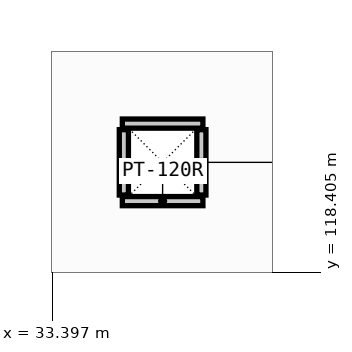
"""IFC4 building model, lengths in metres.
Left out: names, types, materials, properties, quantities, classifications, styles, units other than length and angle.
Written with IfcOpenShell. Run it as: python <this file> out.ifc"""

import sys

from ifc_helpers import new_model, si_unit, direction, frame, frame_2d, origin, place, context, subcontext, project, spatial, rectangle, extrude, element, save


model = new_model("IFC4")
c1 = context("Model", 3, precision=1e-05, world=origin(), true_north=direction((0.0, 1.0)))
c2 = subcontext(c1, "Body", "Model", "MODEL_VIEW")
j1 = project(units=[si_unit("LENGTHUNIT", "METRE"), si_unit("PLANEANGLEUNIT", "RADIAN")], contexts=[c1])
p1 = place(None, origin())
s1 = spatial("IfcSite", under=j1, at=p1, CompositionType="ELEMENT")
p2 = place(p1, origin())
s2 = spatial("IfcBuilding", under=s1, at=p2, CompositionType="ELEMENT")
p3 = place(p2, frame((0.0, 0.0, 4.8)))
s3 = spatial("IfcBuildingStorey", under=s2, at=p3, CompositionType="ELEMENT", Elevation=4.8)
for number, where, z_axis, x_axis in (
    (1, (34.32, 119.34, 0.0), (0.0, 0.0, 1.0), (1.0, 0.0, 0.0)),
    (2, (34.32, 120.36, 0.0), (0.0, 0.0, 1.0), (1.0, 0.0, 0.0)),
):
    element("IfcWall", number, at=place(p3, frame(where, z_axis=z_axis, x_axis=x_axis)), inside=s3, PredefinedType="PARTITIONING", context=c2, shape_type="SweptSolid", body=[
        extrude(rectangle(XDim=1.06, YDim=0.12, at=frame_2d((0.53, 0.0))), origin(), (0.0, 0.0, 1.0), 2.95),
    ])
for number, where, z_axis, x_axis in (
    (3, (34.34, 119.42, 0.0), (0.0, 0.0, 1.0), (0.0, 1.0, 0.0)),
    (4, (35.36, 119.42, 0.0), (0.0, 0.0, 1.0), (0.0, 1.0, 0.0)),
):
    element("IfcWall", number, at=place(p3, frame(where, z_axis=z_axis, x_axis=x_axis)), inside=s3, PredefinedType="PARTITIONING", context=c2, shape_type="SweptSolid", body=[
        extrude(rectangle(XDim=0.86, YDim=0.12, at=frame_2d((0.43, 0.0))), origin(), (0.0, 0.0, 1.0), 2.95),
    ])
save(model, sys.argv[1])
